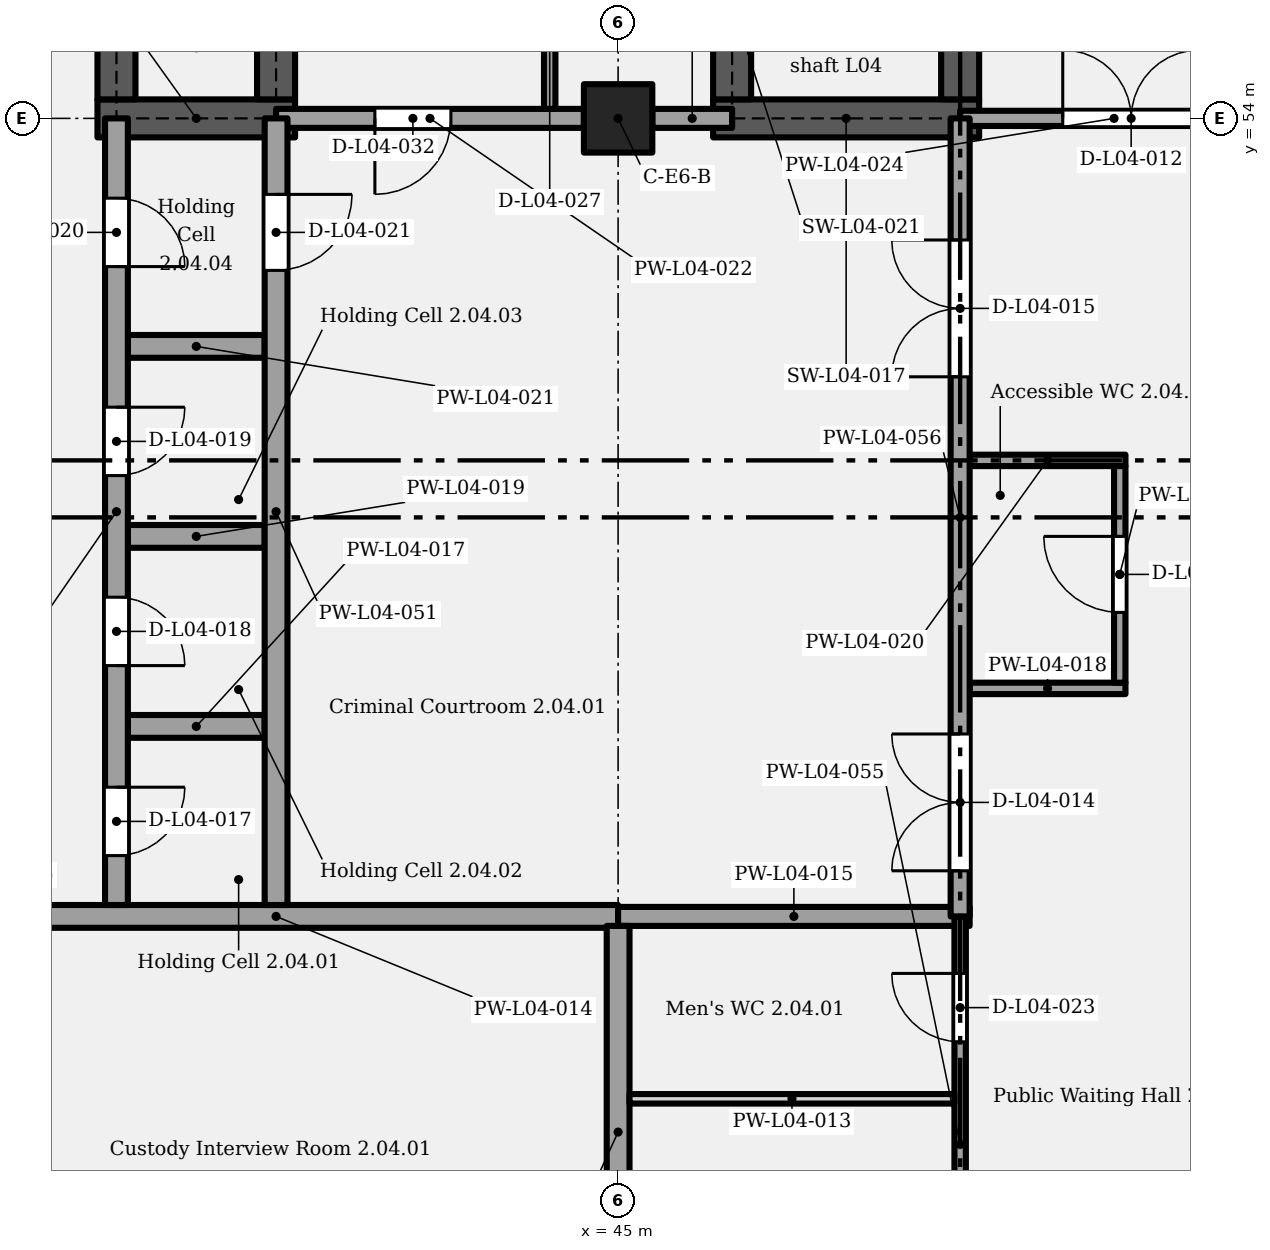
"""IFC4 building model, lengths in metres.
Left out: names, types, materials, properties, quantities, classifications, styles, units other than length and angle.
Written with IfcOpenShell. Run it as: python <this file> out.ifc"""

import sys

from ifc_helpers import new_model, si_unit, direction, frame, frame_2d, origin, origin_2d, place, context, subcontext, project, spatial, rectangle, extrude, element, fill, save


model = new_model("IFC4")
c1 = context("Model", 3, precision=1e-05, world=origin(), true_north=direction((0.0, 1.0)))
c2 = subcontext(c1, "Body", "Model", "MODEL_VIEW")
j1 = project(units=[si_unit("LENGTHUNIT", "METRE"), si_unit("PLANEANGLEUNIT", "RADIAN")], contexts=[c1])
p1 = place(None, origin())
s1 = spatial("IfcSite", under=j1, at=p1, CompositionType="ELEMENT")
p2 = place(p1, origin())
s2 = spatial("IfcBuilding", under=s1, at=p2, CompositionType="ELEMENT")
p3 = place(p2, frame((0.0, 0.0, 22.8)))
s3 = spatial("IfcBuildingStorey", under=s2, at=p3, CompositionType="ELEMENT", Elevation=22.8)
p4 = place(p3, frame((45.0, 54.0, 0.0), z_axis=(0.0, 0.0, 1.0), x_axis=(1.0, 0.0, 0.0)))
e1 = element("IfcColumn", 1, at=p4, inside=s3, PredefinedType="COLUMN", context=c2, shape_type="SweptSolid", body=[
    extrude(rectangle(XDim=0.9, YDim=0.9, at=origin_2d()), origin(), (0.0, 0.0, 1.0), 5.4),
])
p5 = place(p3, frame((38.15, 54.0, 0.0), z_axis=(0.0, 0.0, 1.0), x_axis=(1.0, 0.0, 0.0)))
e2 = element("IfcWall", 2, at=p5, inside=s3, PredefinedType="SHEAR", context=c2, shape_type="SweptSolid", body=[
    extrude(rectangle(XDim=2.6, YDim=0.5, at=frame_2d((1.3, 0.0))), origin(), (0.0, 0.0, 1.0), 5.15),
])
p6 = place(p3, frame((46.25, 54.0, 0.0), z_axis=(0.0, 0.0, 1.0), x_axis=(1.0, 0.0, 0.0)))
e3 = element("IfcWall", 3, at=p6, inside=s3, PredefinedType="SHEAR", context=c2, shape_type="SweptSolid", body=[
    extrude(rectangle(XDim=3.5, YDim=0.5, at=frame_2d((1.75, 0.0))), origin(), (0.0, 0.0, 1.0), 5.15),
])
p7 = place(p3, frame((38.4, 54.25, 0.0), z_axis=(0.0, 0.0, 1.0), x_axis=(0.0, 1.0, 0.0)))
e4 = element("IfcWall", 4, at=p7, inside=s3, PredefinedType="SHEAR", context=c2, shape_type="SweptSolid", body=[
    extrude(rectangle(XDim=2.5, YDim=0.5, at=frame_2d((1.25, 0.0))), origin(), (0.0, 0.0, 1.0), 5.15),
])
p8 = place(p7, frame((0.7, 0.0, 0.0)))
e5 = element("IfcOpeningElement", 5, at=p8, cuts=e4, PredefinedType="OPENING", context=c2, shape_type="SweptSolid", body=[
    extrude(rectangle(XDim=1.1, YDim=2.1, at=frame_2d((0.55, 1.05))), frame((0.0, 0.26, 0.0), z_axis=(0.0, -1.0, 0.0), x_axis=(1.0, 0.0, 0.0)), (0.0, 0.0, 1.0), 0.52),
])
p9 = place(p3, frame((40.5, 54.25, 0.0), z_axis=(0.0, 0.0, 1.0), x_axis=(0.0, 1.0, 0.0)))
e6 = element("IfcWall", 6, at=p9, inside=s3, PredefinedType="SHEAR", context=c2, shape_type="SweptSolid", body=[
    extrude(rectangle(XDim=11.5, YDim=0.5, at=frame_2d((5.75, 0.0))), origin(), (0.0, 0.0, 1.0), 5.15),
])
p10 = place(p3, frame((46.5, 54.25, 0.0), z_axis=(0.0, 0.0, 1.0), x_axis=(0.0, 1.0, 0.0)))
e7 = element("IfcWall", 7, at=p10, inside=s3, PredefinedType="SHEAR", context=c2, shape_type="SweptSolid", body=[
    extrude(rectangle(XDim=2.5, YDim=0.5, at=frame_2d((1.25, 0.0))), origin(), (0.0, 0.0, 1.0), 5.15),
])
p11 = place(p3, frame((49.5, 54.25, 0.0), z_axis=(0.0, 0.0, 1.0), x_axis=(0.0, 1.0, 0.0)))
e8 = element("IfcWall", 8, at=p11, inside=s3, PredefinedType="SHEAR", context=c2, shape_type="SweptSolid", body=[
    extrude(rectangle(XDim=11.5, YDim=0.5, at=frame_2d((5.75, 0.0))), origin(), (0.0, 0.0, 1.0), 5.15),
])
p12 = place(p11, frame((0.7, 0.0, 0.0)))
e9 = element("IfcOpeningElement", 9, at=p12, cuts=e8, PredefinedType="OPENING", context=c2, shape_type="SweptSolid", body=[
    extrude(rectangle(XDim=1.1, YDim=2.1, at=frame_2d((0.55, 1.05))), frame((0.0, 0.26, 0.0), z_axis=(0.0, -1.0, 0.0), x_axis=(1.0, 0.0, 0.0)), (0.0, 0.0, 1.0), 0.52),
])
p13 = place(p11, frame((4.35, 0.0, 0.0), z_axis=(0.0, 0.0, 1.0), x_axis=(-1.0, 0.0, 0.0)))
e10 = element("IfcOpeningElement", 10, at=p13, cuts=e8, PredefinedType="OPENING", context=c2, shape_type="SweptSolid", body=[
    extrude(rectangle(XDim=1.2, YDim=2.1, at=frame_2d((0.6, 1.05))), frame((0.0, 0.26, 0.0), z_axis=(0.0, -1.0, 0.0), x_axis=(1.0, 0.0, 0.0)), (0.0, 0.0, 1.0), 0.52),
])
p14 = place(p3, frame((45.15, 41.1, 0.0), z_axis=(0.0, 0.0, 1.0), x_axis=(1.0, 0.0, 0.0)))
e11 = element("IfcWall", 11, at=p14, inside=s3, PredefinedType="PARTITIONING", context=c2, shape_type="SweptSolid", body=[
    extrude(rectangle(XDim=4.275, YDim=0.125, at=frame_2d((2.138, 0.0))), origin(), (0.0, 0.0, 1.0), 5.15),
])
p15 = place(p3, frame((36.0, 43.5, 0.0), z_axis=(0.0, 0.0, 1.0), x_axis=(1.0, 0.0, 0.0)))
e12 = element("IfcWall", 12, at=p15, inside=s3, PredefinedType="PARTITIONING", context=c2, shape_type="SweptSolid", body=[
    extrude(rectangle(XDim=9.0, YDim=0.3, at=frame_2d((4.5, 0.0))), origin(), (0.0, 0.0, 1.0), 5.15),
])
p16 = place(p15, frame((1.35, 0.0, 0.0), z_axis=(0.0, 0.0, 1.0), x_axis=(-1.0, 0.0, 0.0)))
e13 = element("IfcOpeningElement", 13, at=p16, cuts=e12, PredefinedType="OPENING", context=c2, shape_type="SweptSolid", body=[
    extrude(rectangle(XDim=0.9, YDim=2.1, at=frame_2d((0.45, 1.05))), frame((0.0, 0.16, 0.0), z_axis=(0.0, -1.0, 0.0), x_axis=(1.0, 0.0, 0.0)), (0.0, 0.0, 1.0), 0.32),
])
p17 = place(p3, frame((45.0, 43.5, 0.0), z_axis=(0.0, 0.0, 1.0), x_axis=(1.0, 0.0, 0.0)))
e14 = element("IfcWall", 14, at=p17, inside=s3, PredefinedType="PARTITIONING", context=c2, shape_type="SweptSolid", body=[
    extrude(rectangle(XDim=4.625, YDim=0.25, at=frame_2d((2.312, 0.0))), origin(), (0.0, 0.0, 1.0), 5.15),
])
p18 = place(p3, frame((38.55, 46.0, 0.0), z_axis=(0.0, 0.0, 1.0), x_axis=(1.0, 0.0, 0.0)))
e15 = element("IfcWall", 15, at=p18, inside=s3, PredefinedType="PARTITIONING", context=c2, shape_type="SweptSolid", body=[
    extrude(rectangle(XDim=1.8, YDim=0.3, at=frame_2d((0.9, 0.0))), origin(), (0.0, 0.0, 1.0), 5.15),
])
p19 = place(p3, frame((49.625, 46.5, 0.0), z_axis=(0.0, 0.0, 1.0), x_axis=(1.0, 0.0, 0.0)))
e16 = element("IfcWall", 16, at=p19, inside=s3, PredefinedType="PARTITIONING", context=c2, shape_type="SweptSolid", body=[
    extrude(rectangle(XDim=2.05, YDim=0.15, at=frame_2d((1.025, 0.0))), origin(), (0.0, 0.0, 1.0), 5.15),
])
p20 = place(p3, frame((38.55, 48.5, 0.0), z_axis=(0.0, 0.0, 1.0), x_axis=(1.0, 0.0, 0.0)))
e17 = element("IfcWall", 17, at=p20, inside=s3, PredefinedType="PARTITIONING", context=c2, shape_type="SweptSolid", body=[
    extrude(rectangle(XDim=1.8, YDim=0.3, at=frame_2d((0.9, 0.0))), origin(), (0.0, 0.0, 1.0), 5.15),
])
p21 = place(p3, frame((49.625, 49.5, 0.0), z_axis=(0.0, 0.0, 1.0), x_axis=(1.0, 0.0, 0.0)))
e18 = element("IfcWall", 18, at=p21, inside=s3, PredefinedType="PARTITIONING", context=c2, shape_type="SweptSolid", body=[
    extrude(rectangle(XDim=2.05, YDim=0.15, at=frame_2d((1.025, 0.0))), origin(), (0.0, 0.0, 1.0), 5.15),
])
p22 = place(p3, frame((38.55, 51.0, 0.0), z_axis=(0.0, 0.0, 1.0), x_axis=(1.0, 0.0, 0.0)))
e19 = element("IfcWall", 19, at=p22, inside=s3, PredefinedType="PARTITIONING", context=c2, shape_type="SweptSolid", body=[
    extrude(rectangle(XDim=1.8, YDim=0.3, at=frame_2d((0.9, 0.0))), origin(), (0.0, 0.0, 1.0), 5.15),
])
p23 = place(p3, frame((40.5, 54.0, 0.0), z_axis=(0.0, 0.0, 1.0), x_axis=(1.0, 0.0, 0.0)))
e20 = element("IfcWall", 20, at=p23, inside=s3, PredefinedType="PARTITIONING", context=c2, shape_type="SweptSolid", body=[
    extrude(rectangle(XDim=4.05, YDim=0.25, at=frame_2d((2.025, 0.0))), origin(), (0.0, 0.0, 1.0), 4.4),
])
p24 = place(p23, frame((2.3, 0.0, 0.0), z_axis=(0.0, 0.0, 1.0), x_axis=(-1.0, 0.0, 0.0)))
e21 = element("IfcOpeningElement", 21, at=p24, cuts=e20, PredefinedType="OPENING", context=c2, shape_type="SweptSolid", body=[
    extrude(rectangle(XDim=1.0, YDim=2.1, at=frame_2d((0.5, 1.05))), frame((0.0, 0.135, 0.0), z_axis=(0.0, -1.0, 0.0), x_axis=(1.0, 0.0, 0.0)), (0.0, 0.0, 1.0), 0.27),
])
p25 = place(p3, frame((45.45, 54.0, 0.0), z_axis=(0.0, 0.0, 1.0), x_axis=(1.0, 0.0, 0.0)))
e22 = element("IfcWall", 22, at=p25, inside=s3, PredefinedType="PARTITIONING", context=c2, shape_type="SweptSolid", body=[
    extrude(rectangle(XDim=1.05, YDim=0.25, at=frame_2d((0.525, 0.0))), origin(), (0.0, 0.0, 1.0), 4.4),
])
p26 = place(p3, frame((49.5, 54.0, 0.0), z_axis=(0.0, 0.0, 1.0), x_axis=(1.0, 0.0, 0.0)))
e23 = element("IfcWall", 23, at=p26, inside=s3, PredefinedType="PARTITIONING", context=c2, shape_type="SweptSolid", body=[
    extrude(rectangle(XDim=4.05, YDim=0.2, at=frame_2d((2.025, 0.0))), origin(), (0.0, 0.0, 1.0), 4.4),
])
p27 = place(p26, frame((1.35, 0.0, 0.0)))
e24 = element("IfcOpeningElement", 24, at=p27, cuts=e23, PredefinedType="OPENING", context=c2, shape_type="SweptSolid", body=[
    extrude(rectangle(XDim=1.8, YDim=2.1, at=frame_2d((0.9, 1.05))), frame((0.0, 0.11, 0.0), z_axis=(0.0, -1.0, 0.0), x_axis=(1.0, 0.0, 0.0)), (0.0, 0.0, 1.0), 0.22),
])
p28 = place(p3, frame((38.4, 43.65, 0.0), z_axis=(0.0, 0.0, 1.0), x_axis=(0.0, 1.0, 0.0)))
e25 = element("IfcWall", 25, at=p28, inside=s3, PredefinedType="PARTITIONING", context=c2, shape_type="SweptSolid", body=[
    extrude(rectangle(XDim=10.35, YDim=0.3, at=frame_2d((5.175, 0.0))), origin(), (0.0, 0.0, 1.0), 5.15),
])
p29 = place(p28, frame((1.55, 0.0, 0.0), z_axis=(0.0, 0.0, 1.0), x_axis=(-1.0, 0.0, 0.0)))
e26 = element("IfcOpeningElement", 26, at=p29, cuts=e25, PredefinedType="OPENING", context=c2, shape_type="SweptSolid", body=[
    extrude(rectangle(XDim=0.9, YDim=2.0, at=frame_2d((0.45, 1.0))), frame((0.0, 0.16, 0.0), z_axis=(0.0, -1.0, 0.0), x_axis=(1.0, 0.0, 0.0)), (0.0, 0.0, 1.0), 0.32),
])
p30 = place(p28, frame((4.05, 0.0, 0.0), z_axis=(0.0, 0.0, 1.0), x_axis=(-1.0, 0.0, 0.0)))
e27 = element("IfcOpeningElement", 27, at=p30, cuts=e25, PredefinedType="OPENING", context=c2, shape_type="SweptSolid", body=[
    extrude(rectangle(XDim=0.9, YDim=2.0, at=frame_2d((0.45, 1.0))), frame((0.0, 0.16, 0.0), z_axis=(0.0, -1.0, 0.0), x_axis=(1.0, 0.0, 0.0)), (0.0, 0.0, 1.0), 0.32),
])
p31 = place(p28, frame((6.55, 0.0, 0.0), z_axis=(0.0, 0.0, 1.0), x_axis=(-1.0, 0.0, 0.0)))
e28 = element("IfcOpeningElement", 28, at=p31, cuts=e25, PredefinedType="OPENING", context=c2, shape_type="SweptSolid", body=[
    extrude(rectangle(XDim=0.9, YDim=2.0, at=frame_2d((0.45, 1.0))), frame((0.0, 0.16, 0.0), z_axis=(0.0, -1.0, 0.0), x_axis=(1.0, 0.0, 0.0)), (0.0, 0.0, 1.0), 0.32),
])
p32 = place(p28, frame((9.3, 0.0, 0.0), z_axis=(0.0, 0.0, 1.0), x_axis=(-1.0, 0.0, 0.0)))
e29 = element("IfcOpeningElement", 29, at=p32, cuts=e25, PredefinedType="OPENING", context=c2, shape_type="SweptSolid", body=[
    extrude(rectangle(XDim=0.9, YDim=2.0, at=frame_2d((0.45, 1.0))), frame((0.0, 0.16, 0.0), z_axis=(0.0, -1.0, 0.0), x_axis=(1.0, 0.0, 0.0)), (0.0, 0.0, 1.0), 0.32),
])
p33 = place(p3, frame((40.5, 43.65, 0.0), z_axis=(0.0, 0.0, 1.0), x_axis=(0.0, 1.0, 0.0)))
e30 = element("IfcWall", 30, at=p33, inside=s3, PredefinedType="PARTITIONING", context=c2, shape_type="SweptSolid", body=[
    extrude(rectangle(XDim=10.35, YDim=0.3, at=frame_2d((5.175, 0.0))), origin(), (0.0, 0.0, 1.0), 5.15),
])
p34 = place(p33, frame((9.35, 0.0, 0.0), z_axis=(0.0, 0.0, 1.0), x_axis=(-1.0, 0.0, 0.0)))
e31 = element("IfcOpeningElement", 31, at=p34, cuts=e30, PredefinedType="OPENING", context=c2, shape_type="SweptSolid", body=[
    extrude(rectangle(XDim=1.0, YDim=2.0, at=frame_2d((0.5, 1.0))), frame((0.0, 0.16, 0.0), z_axis=(0.0, -1.0, 0.0), x_axis=(1.0, 0.0, 0.0)), (0.0, 0.0, 1.0), 0.32),
])
p35 = place(p3, frame((44.1, 54.125, 0.0), z_axis=(0.0, 0.0, 1.0), x_axis=(0.0, 1.0, 0.0)))
e32 = element("IfcWall", 32, at=p35, inside=s3, PredefinedType="PARTITIONING", context=c2, shape_type="SweptSolid", body=[
    extrude(rectangle(XDim=8.8, YDim=0.15, at=frame_2d((4.4, 0.0))), origin(), (0.0, 0.0, 1.0), 5.15),
])
p36 = place(p35, frame((0.875, 0.0, 0.0)))
e33 = element("IfcOpeningElement", 33, at=p36, cuts=e32, PredefinedType="OPENING", context=c2, shape_type="SweptSolid", body=[
    extrude(rectangle(XDim=1.0, YDim=2.1, at=frame_2d((0.5, 1.05))), frame((0.0, 0.085, 0.0), z_axis=(0.0, -1.0, 0.0), x_axis=(1.0, 0.0, 0.0)), (0.0, 0.0, 1.0), 0.17),
])
p37 = place(p35, frame((3.925, 0.0, 0.0)))
e34 = element("IfcOpeningElement", 34, at=p37, cuts=e32, PredefinedType="OPENING", context=c2, shape_type="SweptSolid", body=[
    extrude(rectangle(XDim=0.9, YDim=2.1, at=frame_2d((0.45, 1.05))), frame((0.0, 0.085, 0.0), z_axis=(0.0, -1.0, 0.0), x_axis=(1.0, 0.0, 0.0)), (0.0, 0.0, 1.0), 0.17),
])
p38 = place(p35, frame((6.925, 0.0, 0.0)))
e35 = element("IfcOpeningElement", 35, at=p38, cuts=e32, PredefinedType="OPENING", context=c2, shape_type="SweptSolid", body=[
    extrude(rectangle(XDim=0.9, YDim=2.1, at=frame_2d((0.45, 1.05))), frame((0.0, 0.085, 0.0), z_axis=(0.0, -1.0, 0.0), x_axis=(1.0, 0.0, 0.0)), (0.0, 0.0, 1.0), 0.17),
])
p39 = place(p3, frame((45.0, 37.95, 0.0), z_axis=(0.0, 0.0, 1.0), x_axis=(0.0, 1.0, 0.0)))
e36 = element("IfcWall", 36, at=p39, inside=s3, PredefinedType="PARTITIONING", context=c2, shape_type="SweptSolid", body=[
    extrude(rectangle(XDim=5.425, YDim=0.3, at=frame_2d((2.712, 0.0))), origin(), (0.0, 0.0, 1.0), 4.2),
])
p40 = place(p3, frame((49.5, 37.5, 0.0), z_axis=(0.0, 0.0, 1.0), x_axis=(0.0, 1.0, 0.0)))
e37 = element("IfcWall", 37, at=p40, inside=s3, PredefinedType="PARTITIONING", context=c2, shape_type="SweptSolid", body=[
    extrude(rectangle(XDim=6.0, YDim=0.15, at=frame_2d((3.0, 0.0))), origin(), (0.0, 0.0, 1.0), 5.15),
])
p41 = place(p40, frame((1.15, 0.0, 0.0)))
e38 = element("IfcOpeningElement", 38, at=p41, cuts=e37, PredefinedType="OPENING", context=c2, shape_type="SweptSolid", body=[
    extrude(rectangle(XDim=0.9, YDim=2.1, at=frame_2d((0.45, 1.05))), frame((0.0, 0.085, 0.0), z_axis=(0.0, -1.0, 0.0), x_axis=(1.0, 0.0, 0.0)), (0.0, 0.0, 1.0), 0.17),
])
p42 = place(p40, frame((4.35, 0.0, 0.0)))
e39 = element("IfcOpeningElement", 39, at=p42, cuts=e37, PredefinedType="OPENING", context=c2, shape_type="SweptSolid", body=[
    extrude(rectangle(XDim=0.9, YDim=2.1, at=frame_2d((0.45, 1.05))), frame((0.0, 0.085, 0.0), z_axis=(0.0, -1.0, 0.0), x_axis=(1.0, 0.0, 0.0)), (0.0, 0.0, 1.0), 0.17),
])
p43 = place(p3, frame((49.5, 43.5, 0.0), z_axis=(0.0, 0.0, 1.0), x_axis=(0.0, 1.0, 0.0)))
e40 = element("IfcWall", 40, at=p43, inside=s3, PredefinedType="PARTITIONING", context=c2, shape_type="SweptSolid", body=[
    extrude(rectangle(XDim=10.5, YDim=0.25, at=frame_2d((5.25, 0.0))), origin(), (0.0, 0.0, 1.0), 5.15),
])
p44 = place(p43, frame((0.6, 0.0, 0.0)))
e41 = element("IfcOpeningElement", 41, at=p44, cuts=e40, PredefinedType="OPENING", context=c2, shape_type="SweptSolid", body=[
    extrude(rectangle(XDim=1.8, YDim=2.4, at=frame_2d((0.9, 1.2))), frame((0.0, 0.135, 0.0), z_axis=(0.0, -1.0, 0.0), x_axis=(1.0, 0.0, 0.0)), (0.0, 0.0, 1.0), 0.27),
])
p45 = place(p43, frame((7.1, 0.0, 0.0)))
e42 = element("IfcOpeningElement", 42, at=p45, cuts=e40, PredefinedType="OPENING", context=c2, shape_type="SweptSolid", body=[
    extrude(rectangle(XDim=1.8, YDim=2.4, at=frame_2d((0.9, 1.2))), frame((0.0, 0.135, 0.0), z_axis=(0.0, -1.0, 0.0), x_axis=(1.0, 0.0, 0.0)), (0.0, 0.0, 1.0), 0.27),
])
p46 = place(p3, frame((51.6, 46.575, 0.0), z_axis=(0.0, 0.0, 1.0), x_axis=(0.0, 1.0, 0.0)))
e43 = element("IfcWall", 43, at=p46, inside=s3, PredefinedType="PARTITIONING", context=c2, shape_type="SweptSolid", body=[
    extrude(rectangle(XDim=2.85, YDim=0.15, at=frame_2d((1.425, 0.0))), origin(), (0.0, 0.0, 1.0), 5.15),
])
p47 = place(p46, frame((0.925, 0.0, 0.0)))
e44 = element("IfcOpeningElement", 44, at=p47, cuts=e43, PredefinedType="OPENING", context=c2, shape_type="SweptSolid", body=[
    extrude(rectangle(XDim=1.0, YDim=2.1, at=frame_2d((0.5, 1.05))), frame((0.0, 0.085, 0.0), z_axis=(0.0, -1.0, 0.0), x_axis=(1.0, 0.0, 0.0)), (0.0, 0.0, 1.0), 0.17),
])
p48 = place(p27, origin())
e45 = element("IfcDoor", 45, at=p48, inside=s3, OperationType="DOUBLE_DOOR_SINGLE_SWING", PredefinedType="DOOR", context=c2, shape_type="SweptSolid", body=[
    extrude(rectangle(XDim=1.8, YDim=2.1, at=frame_2d((0.9, 1.05))), frame((0.0, 0.025, 0.0), z_axis=(0.0, -1.0, 0.0), x_axis=(1.0, 0.0, 0.0)), (0.0, 0.0, 1.0), 0.05),
])
fill(e24, e45)
p49 = place(p47, origin())
e46 = element("IfcDoor", 46, at=p49, inside=s3, OperationType="SINGLE_SWING_RIGHT", PredefinedType="DOOR", context=c2, shape_type="SweptSolid", body=[
    extrude(rectangle(XDim=1.0, YDim=2.1, at=frame_2d((0.5, 1.05))), frame((0.0, 0.025, 0.0), z_axis=(0.0, -1.0, 0.0), x_axis=(1.0, 0.0, 0.0)), (0.0, 0.0, 1.0), 0.05),
])
fill(e44, e46)
p50 = place(p44, origin())
e47 = element("IfcDoor", 47, at=p50, inside=s3, OperationType="DOUBLE_DOOR_SINGLE_SWING", PredefinedType="DOOR", context=c2, shape_type="SweptSolid", body=[
    extrude(rectangle(XDim=1.8, YDim=2.4, at=frame_2d((0.9, 1.2))), frame((0.0, 0.025, 0.0), z_axis=(0.0, -1.0, 0.0), x_axis=(1.0, 0.0, 0.0)), (0.0, 0.0, 1.0), 0.05),
])
fill(e41, e47)
p51 = place(p45, origin())
e48 = element("IfcDoor", 48, at=p51, inside=s3, OperationType="DOUBLE_DOOR_SINGLE_SWING", PredefinedType="DOOR", context=c2, shape_type="SweptSolid", body=[
    extrude(rectangle(XDim=1.8, YDim=2.4, at=frame_2d((0.9, 1.2))), frame((0.0, 0.025, 0.0), z_axis=(0.0, -1.0, 0.0), x_axis=(1.0, 0.0, 0.0)), (0.0, 0.0, 1.0), 0.05),
])
fill(e42, e48)
p52 = place(p29, origin())
e49 = element("IfcDoor", 49, at=p52, inside=s3, OperationType="SINGLE_SWING_LEFT", PredefinedType="DOOR", context=c2, shape_type="SweptSolid", body=[
    extrude(rectangle(XDim=0.9, YDim=2.0, at=frame_2d((0.45, 1.0))), frame((0.0, 0.025, 0.0), z_axis=(0.0, -1.0, 0.0), x_axis=(1.0, 0.0, 0.0)), (0.0, 0.0, 1.0), 0.05),
])
fill(e26, e49)
p53 = place(p30, origin())
e50 = element("IfcDoor", 50, at=p53, inside=s3, OperationType="SINGLE_SWING_RIGHT", PredefinedType="DOOR", context=c2, shape_type="SweptSolid", body=[
    extrude(rectangle(XDim=0.9, YDim=2.0, at=frame_2d((0.45, 1.0))), frame((0.0, 0.025, 0.0), z_axis=(0.0, -1.0, 0.0), x_axis=(1.0, 0.0, 0.0)), (0.0, 0.0, 1.0), 0.05),
])
fill(e27, e50)
p54 = place(p31, origin())
e51 = element("IfcDoor", 51, at=p54, inside=s3, OperationType="SINGLE_SWING_LEFT", PredefinedType="DOOR", context=c2, shape_type="SweptSolid", body=[
    extrude(rectangle(XDim=0.9, YDim=2.0, at=frame_2d((0.45, 1.0))), frame((0.0, 0.025, 0.0), z_axis=(0.0, -1.0, 0.0), x_axis=(1.0, 0.0, 0.0)), (0.0, 0.0, 1.0), 0.05),
])
fill(e28, e51)
p55 = place(p32, origin())
e52 = element("IfcDoor", 52, at=p55, inside=s3, OperationType="SINGLE_SWING_RIGHT", PredefinedType="DOOR", context=c2, shape_type="SweptSolid", body=[
    extrude(rectangle(XDim=0.9, YDim=2.0, at=frame_2d((0.45, 1.0))), frame((0.0, 0.025, 0.0), z_axis=(0.0, -1.0, 0.0), x_axis=(1.0, 0.0, 0.0)), (0.0, 0.0, 1.0), 0.05),
])
fill(e29, e52)
p56 = place(p34, origin())
e53 = element("IfcDoor", 53, at=p56, inside=s3, OperationType="SINGLE_SWING_LEFT", PredefinedType="DOOR", context=c2, shape_type="SweptSolid", body=[
    extrude(rectangle(XDim=1.0, YDim=2.0, at=frame_2d((0.5, 1.0))), frame((0.0, 0.025, 0.0), z_axis=(0.0, -1.0, 0.0), x_axis=(1.0, 0.0, 0.0)), (0.0, 0.0, 1.0), 0.05),
])
fill(e31, e53)
p57 = place(p42, origin())
e54 = element("IfcDoor", 54, at=p57, inside=s3, OperationType="SINGLE_SWING_RIGHT", PredefinedType="DOOR", context=c2, shape_type="SweptSolid", body=[
    extrude(rectangle(XDim=0.9, YDim=2.1, at=frame_2d((0.45, 1.05))), frame((0.0, 0.025, 0.0), z_axis=(0.0, -1.0, 0.0), x_axis=(1.0, 0.0, 0.0)), (0.0, 0.0, 1.0), 0.05),
])
fill(e39, e54)
p58 = place(p24, origin())
e55 = element("IfcDoor", 55, at=p58, inside=s3, OperationType="SINGLE_SWING_RIGHT", PredefinedType="DOOR", context=c2, shape_type="SweptSolid", body=[
    extrude(rectangle(XDim=1.0, YDim=2.1, at=frame_2d((0.5, 1.05))), frame((0.0, 0.025, 0.0), z_axis=(0.0, -1.0, 0.0), x_axis=(1.0, 0.0, 0.0)), (0.0, 0.0, 1.0), 0.05),
])
fill(e21, e55)
save(model, sys.argv[1])
